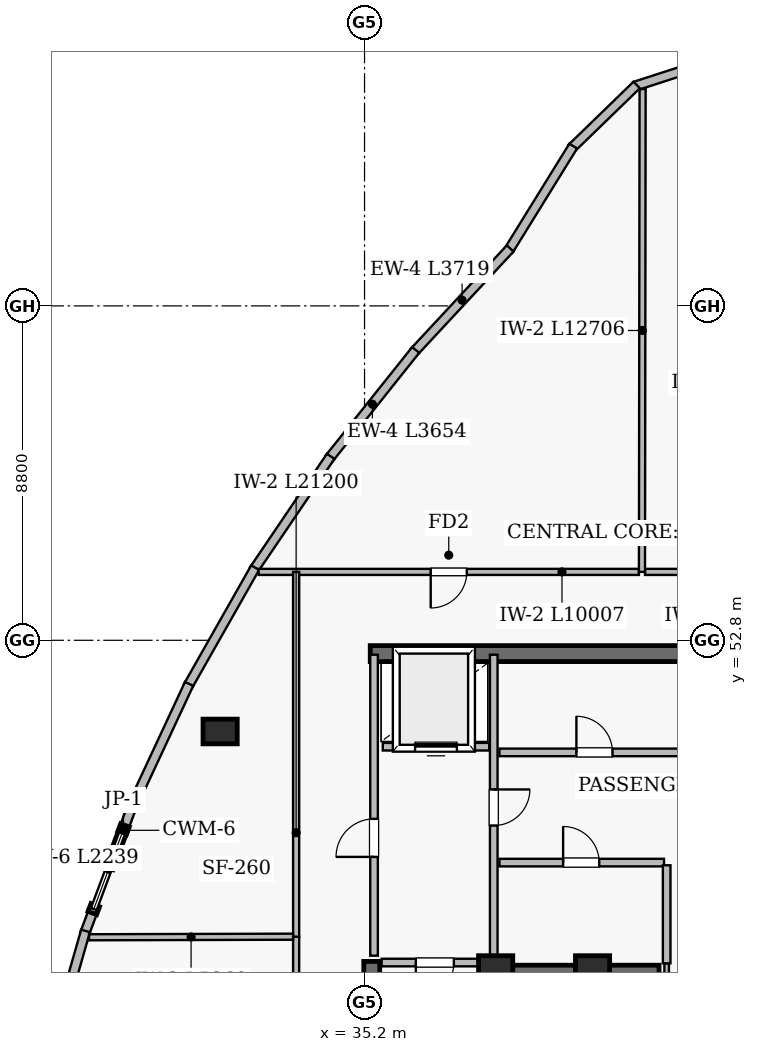
"""IFC4 building model, lengths in metres.
Left out: names, types, materials, properties, quantities, classifications, styles, units other than length and angle.
Written with IfcOpenShell. Run it as: python <this file> out.ifc"""

import sys

from ifc_helpers import new_model, si_unit, direction, frame, frame_2d, origin, origin_2d, place, context, subcontext, project, spatial, rectangle, extrude, element, fill, save


model = new_model("IFC4")
c1 = context("Model", 3, precision=1e-05, world=origin(), true_north=direction((0.0, 1.0)))
c2 = subcontext(c1, "Body", "Model", "MODEL_VIEW")
j1 = project(units=[si_unit("LENGTHUNIT", "METRE"), si_unit("PLANEANGLEUNIT", "RADIAN")], contexts=[c1])
p1 = place(None, origin())
s1 = spatial("IfcSite", under=j1, at=p1, CompositionType="ELEMENT")
p2 = place(p1, origin())
s2 = spatial("IfcBuilding", under=s1, at=p2, CompositionType="ELEMENT")
p3 = place(p2, frame((0.0, 0.0, 312.8)))
s3 = spatial("IfcBuildingStorey", under=s2, at=p3, CompositionType="ELEMENT", Elevation=312.8)
p4 = place(p3, frame((35.35, 52.45, 0.0), z_axis=(0.0, 0.0, 1.0), x_axis=(1.0, 0.0, 0.0)))
e1 = element("IfcWall", 1, at=p4, inside=s3, PredefinedType="SHEAR", context=c2, shape_type="SweptSolid", body=[
    extrude(rectangle(XDim=17.3, YDim=0.42, at=frame_2d((8.65, 0.0))), origin(), (0.0, 0.0, 1.0), 4.99),
])
p5 = place(p3, frame((35.39, 35.18, 0.0), z_axis=(0.0, 0.0, 1.0), x_axis=(0.0, 1.0, 0.0)))
e2 = element("IfcWall", 2, at=p5, inside=s3, PredefinedType="SHEAR", context=c2, shape_type="SweptSolid", body=[
    extrude(rectangle(XDim=9.17, YDim=0.42, at=frame_2d((4.585, 0.0))), origin(), (0.0, 0.0, 1.0), 4.99),
])
p6 = place(p3, frame((38.66, 35.4, 0.0), z_axis=(0.0, 0.0, 1.0), x_axis=(0.0, 1.0, 0.0)))
e3 = element("IfcWall", 3, at=p6, inside=s3, PredefinedType="SHEAR", context=c2, shape_type="SweptSolid", body=[
    extrude(rectangle(XDim=8.95, YDim=0.42, at=frame_2d((4.475, 0.0))), origin(), (0.0, 0.0, 1.0), 4.99),
])
p7 = place(p3, frame((38.75, 44.05, 0.0), z_axis=(0.0, 0.0, 1.0), x_axis=(1.0, 0.0, 0.0)))
e4 = element("IfcWall", 4, at=p7, inside=s3, PredefinedType="SHEAR", context=c2, shape_type="SweptSolid", body=[
    extrude(rectangle(XDim=4.2, YDim=0.4, at=frame_2d((2.1, 0.0))), origin(), (0.0, 0.0, 1.0), 4.99),
])
for number, where, z_axis, x_axis in (
    (5, (38.65, 44.05, 0.0), (0.0, 0.0, 1.0), (1.0, 0.0, 0.0)),
    (6, (41.2, 44.05, 0.0), (0.0, 0.0, 1.0), (1.0, 0.0, 0.0)),
):
    element("IfcColumn", number, at=place(p3, frame(where, z_axis=z_axis, x_axis=x_axis)), inside=s3, PredefinedType="COLUMN", context=c2, shape_type="SweptSolid", body=[
        extrude(rectangle(XDim=0.9, YDim=0.9, at=origin_2d()), origin(), (0.0, 0.0, 1.0), 5.2),
    ])
p8 = place(p3, frame((31.4, 50.4, 0.0), z_axis=(0.0, 0.0, 1.0), x_axis=(1.0, 0.0, 0.0)))
e7 = element("IfcColumn", 7, at=p8, inside=s3, PredefinedType="COLUMN", context=c2, shape_type="SweptSolid", body=[
    extrude(rectangle(XDim=0.9, YDim=0.65, at=origin_2d()), origin(), (0.0, 0.0, 1.0), 5.2),
])
p9 = place(p3, frame((44.033, 67.938, 0.0), z_axis=(0.0, 0.0, 1.0), x_axis=(-0.951517353151, -0.307595069292, 0.0)))
e8 = element("IfcWall", 8, at=p9, inside=s3, PredefinedType="SOLIDWALL", context=c2, shape_type="SweptSolid", body=[
    extrude(rectangle(XDim=1.818, YDim=0.24, at=frame_2d((0.909, 0.0))), origin(), (0.0, 0.0, 1.0), 4.99),
])
p10 = place(p3, frame((42.361, 67.414, 0.0), z_axis=(0.0, 0.0, 1.0), x_axis=(-0.717711443968, -0.69634063733, 0.0)))
e9 = element("IfcWall", 9, at=p10, inside=s3, PredefinedType="SOLIDWALL", context=c2, shape_type="SweptSolid", body=[
    extrude(rectangle(XDim=2.388, YDim=0.24, at=frame_2d((1.194, 0.0))), origin(), (0.0, 0.0, 1.0), 4.99),
])
p11 = place(p3, frame((40.691, 65.805, 0.0), z_axis=(0.0, 0.0, 1.0), x_axis=(-0.526110187608, -0.850416410058, 0.0)))
e10 = element("IfcWall", 10, at=p11, inside=s3, PredefinedType="SOLIDWALL", context=c2, shape_type="SweptSolid", body=[
    extrude(rectangle(XDim=3.233, YDim=0.24, at=frame_2d((1.616, 0.0))), origin(), (0.0, 0.0, 1.0), 4.99),
])
p12 = place(p3, frame((39.033, 63.112, 0.0), z_axis=(0.0, 0.0, 1.0), x_axis=(-0.68087147599, -0.732402917241, 0.0)))
e11 = element("IfcWall", 11, at=p12, inside=s3, PredefinedType="SOLIDWALL", context=c2, shape_type="SweptSolid", body=[
    extrude(rectangle(XDim=3.719, YDim=0.24, at=frame_2d((1.859, 0.0))), origin(), (0.0, 0.0, 1.0), 4.99),
])
p13 = place(p3, frame((36.546, 60.441, 0.0), z_axis=(0.0, 0.0, 1.0), x_axis=(-0.623626980574, -0.781722066402, 0.0)))
e12 = element("IfcWall", 12, at=p13, inside=s3, PredefinedType="SOLIDWALL", context=c2, shape_type="SweptSolid", body=[
    extrude(rectangle(XDim=3.654, YDim=0.24, at=frame_2d((1.827, 0.0))), origin(), (0.0, 0.0, 1.0), 4.99),
])
p14 = place(p3, frame((34.309, 57.641, 0.0), z_axis=(0.0, 0.0, 1.0), x_axis=(-0.560819727484, -0.827937940467, 0.0)))
e13 = element("IfcWall", 13, at=p14, inside=s3, PredefinedType="SOLIDWALL", context=c2, shape_type="SweptSolid", body=[
    extrude(rectangle(XDim=3.609, YDim=0.24, at=frame_2d((1.805, 0.0))), origin(), (0.0, 0.0, 1.0), 4.99),
])
p15 = place(p3, frame((32.322, 54.712, 0.0), z_axis=(0.0, 0.0, 1.0), x_axis=(-0.49340236427, -0.869801188165, 0.0)))
e14 = element("IfcWall", 14, at=p15, inside=s3, PredefinedType="SOLIDWALL", context=c2, shape_type="SweptSolid", body=[
    extrude(rectangle(XDim=3.587, YDim=0.24, at=frame_2d((1.793, 0.0))), origin(), (0.0, 0.0, 1.0), 4.99),
])
p16 = place(p3, frame((30.584, 51.654, 0.0), z_axis=(0.0, 0.0, 1.0), x_axis=(-0.422322757118, -0.906445524464, 0.0)))
e15 = element("IfcWall", 15, at=p16, inside=s3, PredefinedType="SOLIDWALL", context=c2, shape_type="SweptSolid", body=[
    extrude(rectangle(XDim=3.587, YDim=0.24, at=frame_2d((1.793, 0.0))), origin(), (0.0, 0.0, 1.0), 4.99),
])
p17 = place(p3, frame((29.096, 48.467, 0.0), z_axis=(0.0, 0.0, 1.0), x_axis=(-0.349073246867, -0.937095442483, 0.0)))
e16 = element("IfcWall", 16, at=p17, inside=s3, PredefinedType="SOLIDWALL", context=c2, shape_type="SweptSolid", body=[
    extrude(rectangle(XDim=0.705, YDim=0.24, at=frame_2d((0.353, 0.0))), origin(), (0.0, 0.0, 1.0), 4.99),
])
p18 = place(p3, frame((28.083, 45.746, 0.0), z_axis=(0.0, 0.0, 1.0), x_axis=(-0.348960000238, -0.937137619688, 0.0)))
e17 = element("IfcWall", 17, at=p18, inside=s3, PredefinedType="SOLIDWALL", context=c2, shape_type="SweptSolid", body=[
    extrude(rectangle(XDim=0.705, YDim=0.24, at=frame_2d((0.353, 0.0))), origin(), (0.0, 0.0, 1.0), 4.99),
])
p19 = place(p3, frame((27.858, 45.152, 0.0), z_axis=(0.0, 0.0, 1.0), x_axis=(-0.274897629025, -0.961473501224, 0.0)))
e18 = element("IfcWall", 18, at=p19, inside=s3, PredefinedType="SOLIDWALL", context=c2, shape_type="SweptSolid", body=[
    extrude(rectangle(XDim=3.654, YDim=0.24, at=frame_2d((1.827, 0.0))), origin(), (0.0, 0.0, 1.0), 4.99),
])
p20 = place(p3, frame((33.4, 45.0, 0.0), z_axis=(0.0, 0.0, 1.0), x_axis=(0.0, -1.0, 0.0)))
e19 = element("IfcWall", 19, at=p20, inside=s3, PredefinedType="SOLIDWALL", context=c2, shape_type="SweptSolid", body=[
    extrude(rectangle(XDim=11.6, YDim=0.16, at=frame_2d((5.8, 0.0))), origin(), (0.0, 0.0, 1.0), 4.178),
])
p21 = place(p20, frame((4.605, 0.0, 0.0)))
e20 = element("IfcOpeningElement", 20, at=p21, cuts=e19, PredefinedType="OPENING", context=c2, shape_type="SweptSolid", body=[
    extrude(rectangle(XDim=0.95, YDim=2.15, at=frame_2d((0.475, 1.075))), frame((0.0, 0.09, 0.0), z_axis=(0.0, -1.0, 0.0), x_axis=(1.0, 0.0, 0.0)), (0.0, 0.0, 1.0), 0.18),
])
p22 = place(p3, frame((42.42, 54.6, 0.0), z_axis=(0.0, 0.0, 1.0), x_axis=(-1.0, 0.0, 0.0)))
e21 = element("IfcWall", 21, at=p22, inside=s3, PredefinedType="SOLIDWALL", context=c2, shape_type="SweptSolid", body=[
    extrude(rectangle(XDim=10.007, YDim=0.16, at=frame_2d((5.003, 0.0))), origin(), (0.0, 0.0, 1.0), 4.178),
])
p23 = place(p22, frame((4.529, 0.0, 0.0)))
e22 = element("IfcOpeningElement", 22, at=p23, cuts=e21, PredefinedType="OPENING", context=c2, shape_type="SweptSolid", body=[
    extrude(rectangle(XDim=0.95, YDim=2.15, at=frame_2d((0.475, 1.075))), frame((0.0, 0.09, 0.0), z_axis=(0.0, -1.0, 0.0), x_axis=(1.0, 0.0, 0.0)), (0.0, 0.0, 1.0), 0.18),
])
p24 = place(p3, frame((52.47, 54.6, 0.0), z_axis=(0.0, 0.0, 1.0), x_axis=(-1.0, 0.0, 0.0)))
e23 = element("IfcWall", 23, at=p24, inside=s3, PredefinedType="SOLIDWALL", context=c2, shape_type="SweptSolid", body=[
    extrude(rectangle(XDim=9.89, YDim=0.16, at=frame_2d((4.945, 0.0))), origin(), (0.0, 0.0, 1.0), 4.178),
])
p25 = place(p24, frame((4.47, 0.0, 0.0)))
e24 = element("IfcOpeningElement", 24, at=p25, cuts=e23, PredefinedType="OPENING", context=c2, shape_type="SweptSolid", body=[
    extrude(rectangle(XDim=0.95, YDim=2.15, at=frame_2d((0.475, 1.075))), frame((0.0, 0.09, 0.0), z_axis=(0.0, -1.0, 0.0), x_axis=(1.0, 0.0, 0.0)), (0.0, 0.0, 1.0), 0.18),
])
p26 = place(p3, frame((43.15, 35.6, 0.0), z_axis=(0.0, 0.0, 1.0), x_axis=(0.0, 1.0, 0.0)))
e25 = element("IfcWall", 25, at=p26, inside=s3, PredefinedType="PARTITIONING", context=c2, shape_type="SweptSolid", body=[
    extrude(rectangle(XDim=8.7, YDim=0.12, at=frame_2d((4.35, 0.0))), origin(), (0.0, 0.0, 1.0), 4.99),
])
p27 = place(p26, frame((0.66, 0.0, 0.0)))
e26 = element("IfcOpeningElement", 26, at=p27, cuts=e25, PredefinedType="OPENING", context=c2, shape_type="SweptSolid", body=[
    extrude(rectangle(XDim=0.88, YDim=2.1, at=frame_2d((0.44, 1.05))), frame((0.0, 0.07, 0.0), z_axis=(0.0, -1.0, 0.0), x_axis=(1.0, 0.0, 0.0)), (0.0, 0.0, 1.0), 0.14),
])
p28 = place(p26, frame((4.74, 0.0, 0.0)))
e27 = element("IfcOpeningElement", 27, at=p28, cuts=e25, PredefinedType="OPENING", context=c2, shape_type="SweptSolid", body=[
    extrude(rectangle(XDim=0.92, YDim=2.1, at=frame_2d((0.46, 1.05))), frame((0.0, 0.07, 0.0), z_axis=(0.0, -1.0, 0.0), x_axis=(1.0, 0.0, 0.0)), (0.0, 0.0, 1.0), 0.14),
])
p29 = place(p3, frame((35.45, 44.5, 0.0), z_axis=(0.0, 0.0, 1.0), x_axis=(0.0, 1.0, 0.0)))
e28 = element("IfcWall", 28, at=p29, inside=s3, PredefinedType="SOLIDWALL", context=c2, shape_type="SweptSolid", body=[
    extrude(rectangle(XDim=7.92, YDim=0.2, at=frame_2d((3.96, 0.0))), origin(), (0.0, 0.0, 1.0), 4.99),
])
p30 = place(p29, frame((2.6, 0.0, 0.0)))
e29 = element("IfcOpeningElement", 29, at=p30, cuts=e28, PredefinedType="OPENING", context=c2, shape_type="SweptSolid", body=[
    extrude(rectangle(XDim=1.0, YDim=2.15, at=frame_2d((0.5, 1.075))), frame((0.0, 0.11, 0.0), z_axis=(0.0, -1.0, 0.0), x_axis=(1.0, 0.0, 0.0)), (0.0, 0.0, 1.0), 0.22),
])
p31 = place(p3, frame((38.6, 44.5, 0.0), z_axis=(0.0, 0.0, 1.0), x_axis=(0.0, 1.0, 0.0)))
e30 = element("IfcWall", 30, at=p31, inside=s3, PredefinedType="SOLIDWALL", context=c2, shape_type="SweptSolid", body=[
    extrude(rectangle(XDim=7.92, YDim=0.2, at=frame_2d((3.96, 0.0))), origin(), (0.0, 0.0, 1.0), 4.99),
])
p32 = place(p31, frame((3.425, 0.0, 0.0)))
e31 = element("IfcOpeningElement", 31, at=p32, cuts=e30, PredefinedType="OPENING", context=c2, shape_type="SweptSolid", body=[
    extrude(rectangle(XDim=0.95, YDim=2.15, at=frame_2d((0.475, 1.075))), frame((0.0, 0.11, 0.0), z_axis=(0.0, -1.0, 0.0), x_axis=(1.0, 0.0, 0.0)), (0.0, 0.0, 1.0), 0.22),
])
p33 = place(p3, frame((38.75, 49.85, 0.0), z_axis=(0.0, 0.0, 1.0), x_axis=(1.0, 0.0, 0.0)))
e32 = element("IfcWall", 32, at=p33, inside=s3, PredefinedType="SOLIDWALL", context=c2, shape_type="SweptSolid", body=[
    extrude(rectangle(XDim=5.5, YDim=0.2, at=frame_2d((2.75, 0.0))), origin(), (0.0, 0.0, 1.0), 4.99),
])
p34 = place(p33, frame((2.025, 0.0, 0.0)))
e33 = element("IfcOpeningElement", 33, at=p34, cuts=e32, PredefinedType="OPENING", context=c2, shape_type="SweptSolid", body=[
    extrude(rectangle(XDim=0.95, YDim=2.15, at=frame_2d((0.475, 1.075))), frame((0.0, 0.11, 0.0), z_axis=(0.0, -1.0, 0.0), x_axis=(1.0, 0.0, 0.0)), (0.0, 0.0, 1.0), 0.22),
])
p35 = place(p3, frame((38.75, 46.95, 0.0), z_axis=(0.0, 0.0, 1.0), x_axis=(1.0, 0.0, 0.0)))
e34 = element("IfcWall", 34, at=p35, inside=s3, PredefinedType="SOLIDWALL", context=c2, shape_type="SweptSolid", body=[
    extrude(rectangle(XDim=4.33, YDim=0.2, at=frame_2d((2.165, 0.0))), origin(), (0.0, 0.0, 1.0), 4.99),
])
p36 = place(p35, frame((1.675, 0.0, 0.0)))
e35 = element("IfcOpeningElement", 35, at=p36, cuts=e34, PredefinedType="OPENING", context=c2, shape_type="SweptSolid", body=[
    extrude(rectangle(XDim=0.95, YDim=2.1, at=frame_2d((0.475, 1.05))), frame((0.0, 0.11, 0.0), z_axis=(0.0, -1.0, 0.0), x_axis=(1.0, 0.0, 0.0)), (0.0, 0.0, 1.0), 0.22),
])
p37 = place(p3, frame((35.65, 44.32, 0.0), z_axis=(0.0, 0.0, 1.0), x_axis=(1.0, 0.0, 0.0)))
e36 = element("IfcWall", 36, at=p37, inside=s3, PredefinedType="SOLIDWALL", context=c2, shape_type="SweptSolid", body=[
    extrude(rectangle(XDim=2.8, YDim=0.2, at=frame_2d((1.4, 0.0))), origin(), (0.0, 0.0, 1.0), 4.99),
])
p38 = place(p37, frame((0.9, 0.0, 0.0)))
e37 = element("IfcOpeningElement", 37, at=p38, cuts=e36, PredefinedType="OPENING", context=c2, shape_type="SweptSolid", body=[
    extrude(rectangle(XDim=1.0, YDim=2.15, at=frame_2d((0.5, 1.075))), frame((0.0, 0.11, 0.0), z_axis=(0.0, -1.0, 0.0), x_axis=(1.0, 0.0, 0.0)), (0.0, 0.0, 1.0), 0.22),
])
p39 = place(p3, frame((35.68, 50.0, 0.0), z_axis=(0.0, 0.0, 1.0), x_axis=(1.0, 0.0, 0.0)))
e38 = element("IfcWall", 38, at=p39, inside=s3, PredefinedType="SOLIDWALL", context=c2, shape_type="SweptSolid", body=[
    extrude(rectangle(XDim=2.8, YDim=0.2, at=frame_2d((1.4, 0.0))), origin(), (0.0, 0.0, 1.0), 4.99),
])
p40 = place(p39, frame((0.85, 0.0, 0.0)))
e39 = element("IfcOpeningElement", 39, at=p40, cuts=e38, PredefinedType="OPENING", context=c2, shape_type="SweptSolid", body=[
    extrude(rectangle(XDim=1.1, YDim=2.15, at=frame_2d((0.55, 1.075))), frame((0.0, 0.11, 0.0), z_axis=(0.0, -1.0, 0.0), x_axis=(1.0, 0.0, 0.0)), (0.0, 0.0, 1.0), 0.22),
])
p41 = place(p3, frame((42.5, 54.6, 0.0), z_axis=(0.0, 0.0, 1.0), x_axis=(0.001345040384, 0.999999095433, 0.0)))
e40 = element("IfcWall", 40, at=p41, inside=s3, PredefinedType="SOLIDWALL", context=c2, shape_type="SweptSolid", body=[
    extrude(rectangle(XDim=12.706, YDim=0.16, at=frame_2d((6.353, 0.0))), origin(), (0.0, 0.0, 1.0), 4.178),
])
p42 = place(p3, frame((33.4, 54.6, 0.0), z_axis=(0.0, 0.0, 1.0), x_axis=(0.0, -1.0, 0.0)))
e41 = element("IfcWall", 41, at=p42, inside=s3, PredefinedType="SOLIDWALL", context=c2, shape_type="SweptSolid", body=[
    extrude(rectangle(XDim=9.6, YDim=0.16, at=frame_2d((4.8, 0.0))), origin(), (0.0, 0.0, 1.0), 4.178),
])
p43 = place(p3, frame((33.32, 45.0, 0.0), z_axis=(0.0, 0.0, 1.0), x_axis=(-0.999996153217, -0.002773725234, 0.0)))
e42 = element("IfcWall", 42, at=p43, inside=s3, PredefinedType="SOLIDWALL", context=c2, shape_type="SweptSolid", body=[
    extrude(rectangle(XDim=5.369, YDim=0.16, at=frame_2d((2.685, 0.0))), origin(), (0.0, 0.0, 1.0), 4.178),
])
p44 = place(p3, frame((43.15, 44.3, 0.0), z_axis=(0.0, 0.0, 1.0), x_axis=(0.0, 1.0, 0.0)))
e43 = element("IfcWall", 43, at=p44, inside=s3, PredefinedType="SOLIDWALL", context=c2, shape_type="SweptSolid", body=[
    extrude(rectangle(XDim=2.58, YDim=0.2, at=frame_2d((1.29, 0.0))), origin(), (0.0, 0.0, 1.0), 4.99),
])
p45 = place(p38, frame((1.0, 0.0, 0.0), z_axis=(0.0, 0.0, 1.0), x_axis=(-1.0, 0.0, 0.0)))
e44 = element("IfcDoor", 44, at=p45, inside=s3, OperationType="SINGLE_SWING_LEFT", PredefinedType="DOOR", context=c2, shape_type="SweptSolid", body=[
    extrude(rectangle(XDim=1.0, YDim=2.15, at=frame_2d((0.5, 1.075))), frame((0.0, 0.025, 0.0), z_axis=(0.0, -1.0, 0.0), x_axis=(1.0, 0.0, 0.0)), (0.0, 0.0, 1.0), 0.05),
])
fill(e37, e44)
p46 = place(p30, origin())
e45 = element("IfcDoor", 45, at=p46, inside=s3, OperationType="SINGLE_SWING_LEFT", PredefinedType="DOOR", context=c2, shape_type="SweptSolid", body=[
    extrude(rectangle(XDim=1.0, YDim=2.15, at=frame_2d((0.5, 1.075))), frame((0.0, 0.025, 0.0), z_axis=(0.0, -1.0, 0.0), x_axis=(1.0, 0.0, 0.0)), (0.0, 0.0, 1.0), 0.05),
])
fill(e29, e45)
p47 = place(p32, frame((0.95, 0.0, 0.0), z_axis=(0.0, 0.0, 1.0), x_axis=(-1.0, 0.0, 0.0)))
e46 = element("IfcDoor", 46, at=p47, inside=s3, OperationType="SINGLE_SWING_RIGHT", PredefinedType="DOOR", context=c2, shape_type="SweptSolid", body=[
    extrude(rectangle(XDim=0.95, YDim=2.15, at=frame_2d((0.475, 1.075))), frame((0.0, 0.025, 0.0), z_axis=(0.0, -1.0, 0.0), x_axis=(1.0, 0.0, 0.0)), (0.0, 0.0, 1.0), 0.05),
])
fill(e31, e46)
p48 = place(p40, origin())
e47 = element("IfcDoor", 47, at=p48, inside=s3, OperationType="SLIDING_TO_LEFT", PredefinedType="DOOR", context=c2, shape_type="SweptSolid", body=[
    extrude(rectangle(XDim=1.1, YDim=2.15, at=frame_2d((0.55, 1.075))), frame((0.0, 0.025, 0.0), z_axis=(0.0, -1.0, 0.0), x_axis=(1.0, 0.0, 0.0)), (0.0, 0.0, 1.0), 0.05),
])
fill(e39, e47)
p49 = place(p34, origin())
e48 = element("IfcDoor", 48, at=p49, inside=s3, OperationType="SINGLE_SWING_LEFT", PredefinedType="DOOR", context=c2, shape_type="SweptSolid", body=[
    extrude(rectangle(XDim=0.95, YDim=2.15, at=frame_2d((0.475, 1.075))), frame((0.0, 0.025, 0.0), z_axis=(0.0, -1.0, 0.0), x_axis=(1.0, 0.0, 0.0)), (0.0, 0.0, 1.0), 0.05),
])
fill(e33, e48)
p50 = place(p36, origin())
e49 = element("IfcDoor", 49, at=p50, inside=s3, OperationType="SINGLE_SWING_LEFT", PredefinedType="DOOR", context=c2, shape_type="SweptSolid", body=[
    extrude(rectangle(XDim=0.95, YDim=2.1, at=frame_2d((0.475, 1.05))), frame((0.0, 0.025, 0.0), z_axis=(0.0, -1.0, 0.0), x_axis=(1.0, 0.0, 0.0)), (0.0, 0.0, 1.0), 0.05),
])
fill(e35, e49)
p51 = place(p23, origin())
e50 = element("IfcDoor", 50, at=p51, inside=s3, OperationType="SINGLE_SWING_RIGHT", PredefinedType="DOOR", context=c2, shape_type="SweptSolid", body=[
    extrude(rectangle(XDim=0.95, YDim=2.15, at=frame_2d((0.475, 1.075))), frame((0.0, 0.025, 0.0), z_axis=(0.0, -1.0, 0.0), x_axis=(1.0, 0.0, 0.0)), (0.0, 0.0, 1.0), 0.05),
])
fill(e22, e50)
save(model, sys.argv[1])
